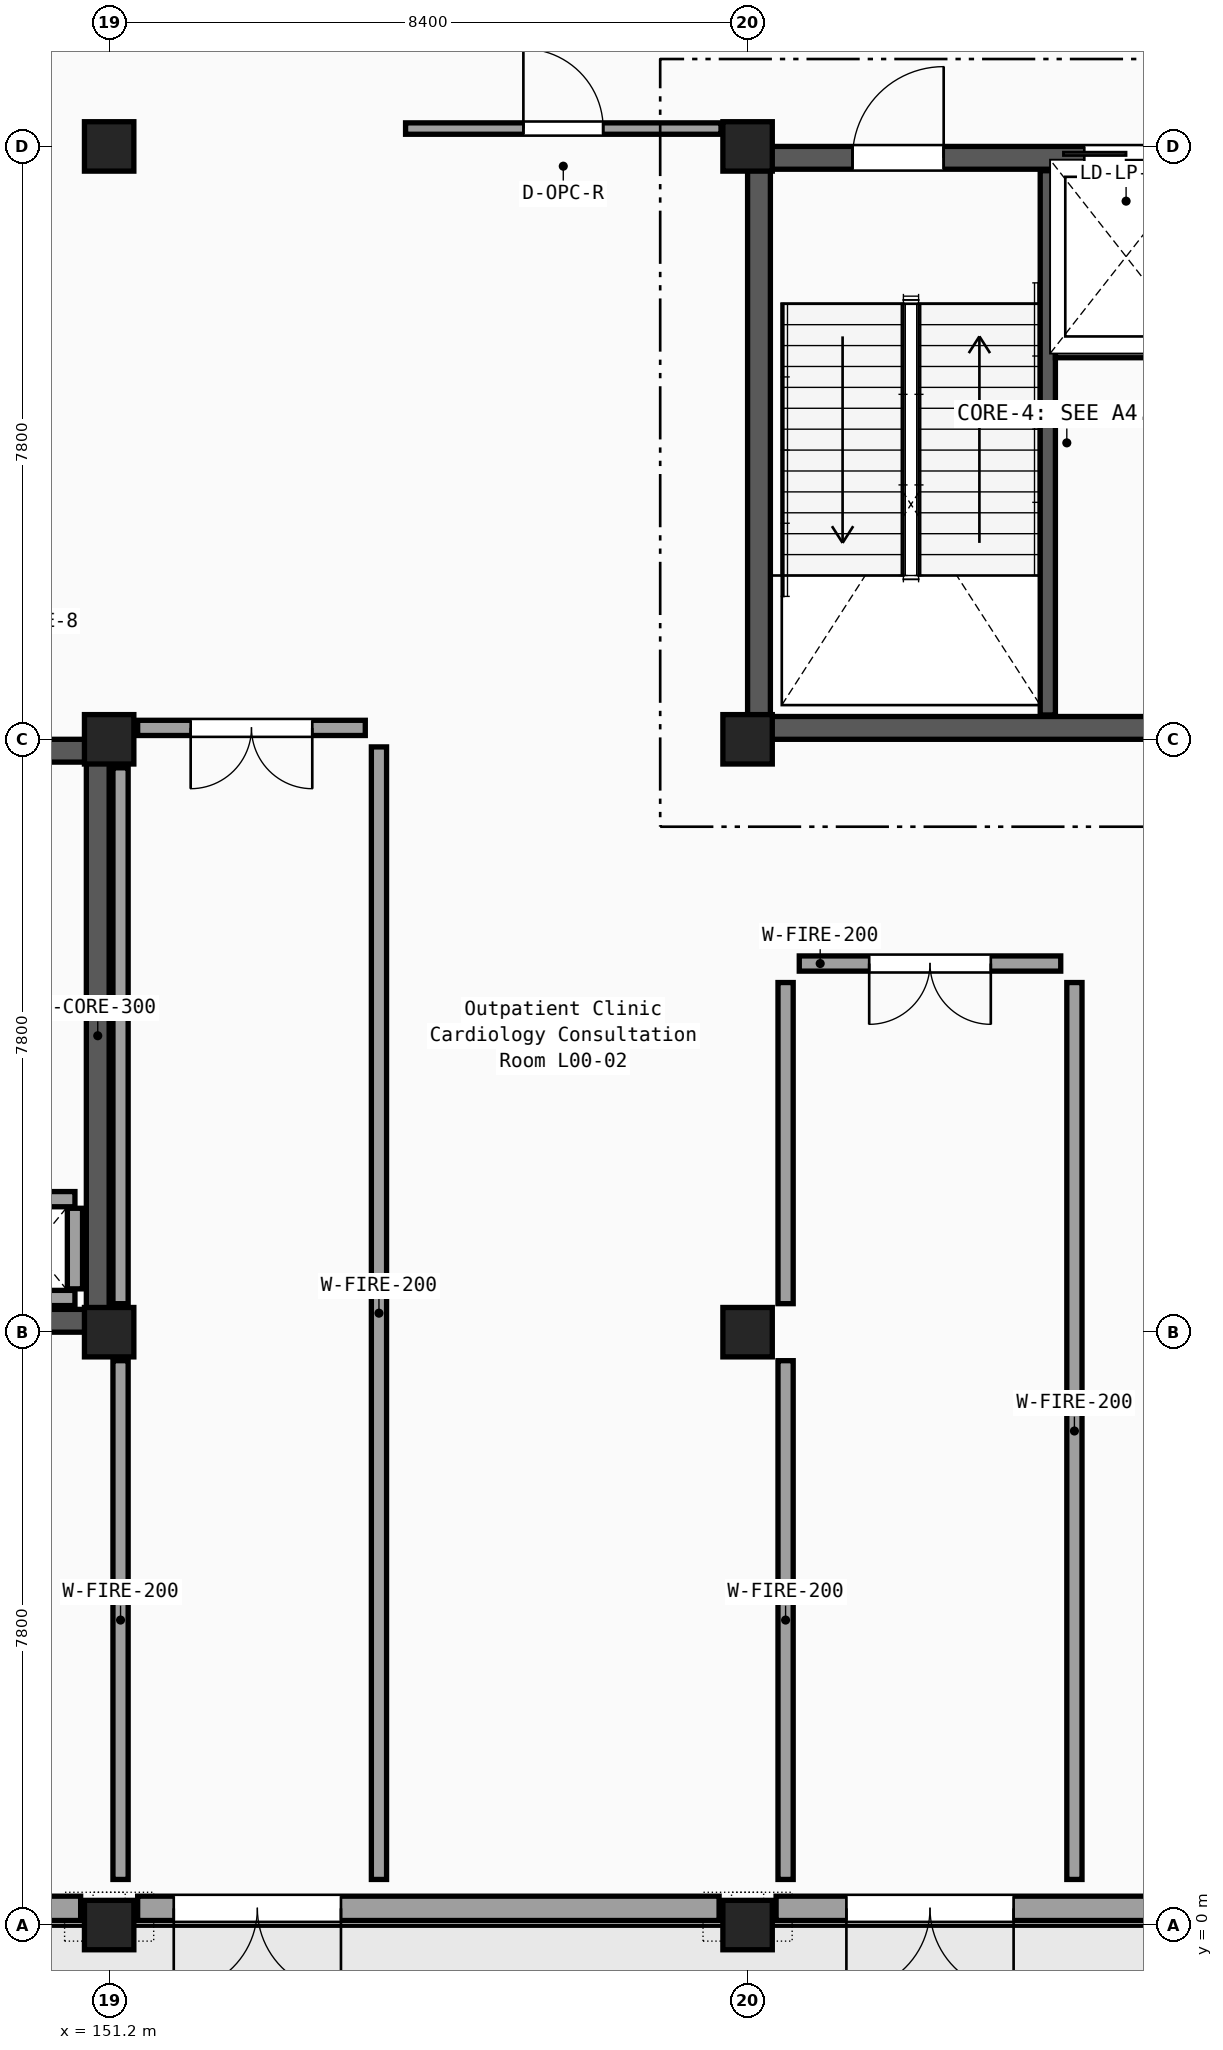
"""IFC4 building model, lengths in metres.
Left out: names, types, materials, properties, quantities, classifications, styles, units other than length and angle.
Written with IfcOpenShell. Run it as: python <this file> out.ifc"""

import sys

from ifc_helpers import new_model, si_unit, direction, frame, frame_2d, origin, origin_2d, place, context, subcontext, project, spatial, rectangle, extrude, element, fill, save


model = new_model("IFC4")
c1 = context("Model", 3, precision=1e-05, world=origin(), true_north=direction((0.0, 1.0)))
c2 = subcontext(c1, "Body", "Model", "MODEL_VIEW")
j1 = project(units=[si_unit("LENGTHUNIT", "METRE"), si_unit("PLANEANGLEUNIT", "RADIAN")], contexts=[c1])
p1 = place(None, origin())
s1 = spatial("IfcSite", under=j1, at=p1, CompositionType="ELEMENT")
p2 = place(p1, origin())
s2 = spatial("IfcBuilding", under=s1, at=p2, CompositionType="ELEMENT")
p3 = place(p2, origin())
s3 = spatial("IfcBuildingStorey", under=s2, at=p3, CompositionType="ELEMENT", Elevation=0.0)
for number, where, z_axis, x_axis in (
    (1, (151.2, 0.0, 0.0), (0.0, 0.0, 1.0), (1.0, 0.0, 0.0)),
    (2, (151.2, 7.8, 0.0), (0.0, 0.0, 1.0), (1.0, 0.0, 0.0)),
    (3, (151.2, 15.6, 0.0), (0.0, 0.0, 1.0), (1.0, 0.0, 0.0)),
    (4, (151.2, 23.4, 0.0), (0.0, 0.0, 1.0), (1.0, 0.0, 0.0)),
    (5, (159.6, 0.0, 0.0), (0.0, 0.0, 1.0), (1.0, 0.0, 0.0)),
    (6, (159.6, 7.8, 0.0), (0.0, 0.0, 1.0), (1.0, 0.0, 0.0)),
    (7, (159.6, 15.6, 0.0), (0.0, 0.0, 1.0), (1.0, 0.0, 0.0)),
    (8, (159.6, 23.4, 0.0), (0.0, 0.0, 1.0), (1.0, 0.0, 0.0)),
):
    element("IfcColumn", number, at=place(p3, frame(where, z_axis=z_axis, x_axis=x_axis)), inside=s3, PredefinedType="COLUMN", context=c2, shape_type="SweptSolid", body=[
        extrude(rectangle(XDim=0.65, YDim=0.65, at=origin_2d()), origin(), (0.0, 0.0, 1.0), 5.1),
    ])
p4 = place(p3, frame((143.175, 0.22, 0.0), z_axis=(0.0, 0.0, 1.0), x_axis=(1.0, 0.0, 0.0)))
e9 = element("IfcWall", 9, at=p4, inside=s3, PredefinedType="SOLIDWALL", context=c2, shape_type="SweptSolid", body=[
    extrude(rectangle(XDim=7.65, YDim=0.32, at=frame_2d((3.825, 0.0))), origin(), (0.0, 0.0, 1.0), 4.46),
])
p5 = place(p4, frame((2.725, 0.0, 0.0)))
e10 = element("IfcOpeningElement", 10, at=p5, cuts=e9, PredefinedType="OPENING", context=c2, shape_type="SweptSolid", body=[
    extrude(rectangle(XDim=2.2, YDim=2.3, at=frame_2d((1.1, 1.15))), frame((0.0, 0.17, 0.0), z_axis=(0.0, -1.0, 0.0), x_axis=(1.0, 0.0, 0.0)), (0.0, 0.0, 1.0), 0.34),
])
p6 = place(p3, frame((151.575, 0.22, 0.0), z_axis=(0.0, 0.0, 1.0), x_axis=(1.0, 0.0, 0.0)))
e11 = element("IfcWall", 11, at=p6, inside=s3, PredefinedType="SOLIDWALL", context=c2, shape_type="SweptSolid", body=[
    extrude(rectangle(XDim=7.65, YDim=0.32, at=frame_2d((3.825, 0.0))), origin(), (0.0, 0.0, 1.0), 4.46),
])
p7 = place(p6, frame((0.475, 0.0, 0.0)))
e12 = element("IfcOpeningElement", 12, at=p7, cuts=e11, PredefinedType="OPENING", context=c2, shape_type="SweptSolid", body=[
    extrude(rectangle(XDim=2.2, YDim=2.3, at=frame_2d((1.1, 1.15))), frame((0.0, 0.17, 0.0), z_axis=(0.0, -1.0, 0.0), x_axis=(1.0, 0.0, 0.0)), (0.0, 0.0, 1.0), 0.34),
])
p8 = place(p3, frame((159.975, 0.22, 0.0), z_axis=(0.0, 0.0, 1.0), x_axis=(1.0, 0.0, 0.0)))
e13 = element("IfcWall", 13, at=p8, inside=s3, PredefinedType="SOLIDWALL", context=c2, shape_type="SweptSolid", body=[
    extrude(rectangle(XDim=7.65, YDim=0.32, at=frame_2d((3.825, 0.0))), origin(), (0.0, 0.0, 1.0), 4.46),
])
p9 = place(p8, frame((0.925, 0.0, 0.0)))
e14 = element("IfcOpeningElement", 14, at=p9, cuts=e13, PredefinedType="OPENING", context=c2, shape_type="SweptSolid", body=[
    extrude(rectangle(XDim=2.2, YDim=2.3, at=frame_2d((1.1, 1.15))), frame((0.0, 0.17, 0.0), z_axis=(0.0, -1.0, 0.0), x_axis=(1.0, 0.0, 0.0)), (0.0, 0.0, 1.0), 0.34),
])
p10 = place(p3, frame((159.6, 15.75, 0.0), z_axis=(0.0, 0.0, 1.0), x_axis=(1.0, 0.0, 0.0)))
e15 = element("IfcWall", 15, at=p10, inside=s3, PredefinedType="SHEAR", context=c2, shape_type="SweptSolid", body=[
    extrude(rectangle(XDim=8.4, YDim=0.3, at=frame_2d((4.2, 0.0))), origin(), (0.0, 0.0, 1.0), 4.87),
])
p11 = place(p3, frame((159.6, 23.25, 0.0), z_axis=(0.0, 0.0, 1.0), x_axis=(1.0, 0.0, 0.0)))
e16 = element("IfcWall", 16, at=p11, inside=s3, PredefinedType="SHEAR", context=c2, shape_type="SweptSolid", body=[
    extrude(rectangle(XDim=8.4, YDim=0.3, at=frame_2d((4.2, 0.0))), origin(), (0.0, 0.0, 1.0), 4.87),
])
p12 = place(p11, frame((1.38, 0.0, 0.0)))
e17 = element("IfcOpeningElement", 17, at=p12, cuts=e16, PredefinedType="OPENING", context=c2, shape_type="SweptSolid", body=[
    extrude(rectangle(XDim=1.2, YDim=2.15, at=frame_2d((0.6, 1.075))), frame((0.0, 0.16, 0.0), z_axis=(0.0, -1.0, 0.0), x_axis=(1.0, 0.0, 0.0)), (0.0, 0.0, 1.0), 0.32),
])
p13 = place(p11, frame((4.43, 0.0, 0.0)))
e18 = element("IfcOpeningElement", 18, at=p13, cuts=e16, PredefinedType="OPENING", context=c2, shape_type="SweptSolid", body=[
    extrude(rectangle(XDim=1.1, YDim=2.15, at=frame_2d((0.55, 1.075))), frame((0.0, 0.16, 0.0), z_axis=(0.0, -1.0, 0.0), x_axis=(1.0, 0.0, 0.0)), (0.0, 0.0, 1.0), 0.32),
])
p14 = place(p11, frame((6.45, 0.0, 0.0)))
e19 = element("IfcOpeningElement", 19, at=p14, cuts=e16, PredefinedType="OPENING", context=c2, shape_type="SweptSolid", body=[
    extrude(rectangle(XDim=1.1, YDim=2.15, at=frame_2d((0.55, 1.075))), frame((0.0, 0.16, 0.0), z_axis=(0.0, -1.0, 0.0), x_axis=(1.0, 0.0, 0.0)), (0.0, 0.0, 1.0), 0.32),
])
p15 = place(p3, frame((159.75, 15.9, 0.0), z_axis=(0.0, 0.0, 1.0), x_axis=(0.0, 1.0, 0.0)))
e20 = element("IfcWall", 20, at=p15, inside=s3, PredefinedType="SHEAR", context=c2, shape_type="SweptSolid", body=[
    extrude(rectangle(XDim=7.2, YDim=0.3, at=frame_2d((3.6, 0.0))), origin(), (0.0, 0.0, 1.0), 4.87),
])
p16 = place(p3, frame((163.55, 15.92, 0.0), z_axis=(0.0, 0.0, 1.0), x_axis=(0.0, 1.0, 0.0)))
e21 = element("IfcWall", 21, at=p16, inside=s3, PredefinedType="SHEAR", context=c2, shape_type="SweptSolid", body=[
    extrude(rectangle(XDim=7.16, YDim=0.2, at=frame_2d((3.58, 0.0))), origin(), (0.0, 0.0, 1.0), 4.87),
])
p17 = place(p3, frame((163.65, 20.72, 0.0), z_axis=(0.0, 0.0, 1.0), x_axis=(1.0, 0.0, 0.0)))
e22 = element("IfcWall", 22, at=p17, inside=s3, PredefinedType="PARTITIONING", context=c2, shape_type="SweptSolid", body=[
    extrude(rectangle(XDim=1.86, YDim=0.2, at=frame_2d((0.93, 0.0))), origin(), (0.0, 0.0, 1.0), 4.35),
])
p18 = place(p3, frame((142.8, 7.95, 0.0), z_axis=(0.0, 0.0, 1.0), x_axis=(1.0, 0.0, 0.0)))
e23 = element("IfcWall", 23, at=p18, inside=s3, PredefinedType="SHEAR", context=c2, shape_type="SweptSolid", body=[
    extrude(rectangle(XDim=8.4, YDim=0.3, at=frame_2d((4.2, 0.0))), origin(), (0.0, 0.0, 1.0), 4.87),
])
p19 = place(p3, frame((142.8, 15.45, 0.0), z_axis=(0.0, 0.0, 1.0), x_axis=(1.0, 0.0, 0.0)))
e24 = element("IfcWall", 24, at=p19, inside=s3, PredefinedType="SHEAR", context=c2, shape_type="SweptSolid", body=[
    extrude(rectangle(XDim=8.4, YDim=0.3, at=frame_2d((4.2, 0.0))), origin(), (0.0, 0.0, 1.0), 4.87),
])
p20 = place(p19, frame((1.38, 0.0, 0.0)))
e25 = element("IfcOpeningElement", 25, at=p20, cuts=e24, PredefinedType="OPENING", context=c2, shape_type="SweptSolid", body=[
    extrude(rectangle(XDim=1.2, YDim=2.15, at=frame_2d((0.6, 1.075))), frame((0.0, 0.16, 0.0), z_axis=(0.0, -1.0, 0.0), x_axis=(1.0, 0.0, 0.0)), (0.0, 0.0, 1.0), 0.32),
])
p21 = place(p3, frame((151.05, 8.1, 0.0), z_axis=(0.0, 0.0, 1.0), x_axis=(0.0, 1.0, 0.0)))
e26 = element("IfcWall", 26, at=p21, inside=s3, PredefinedType="SHEAR", context=c2, shape_type="SweptSolid", body=[
    extrude(rectangle(XDim=7.2, YDim=0.3, at=frame_2d((3.6, 0.0))), origin(), (0.0, 0.0, 1.0), 4.87),
])
for number, where, z_axis, x_axis in (
    (27, (149.65, 8.25, 0.0), (0.0, 0.0, 1.0), (1.0, 0.0, 0.0)),
    (28, (149.65, 9.55, 0.0), (0.0, 0.0, 1.0), (1.0, 0.0, 0.0)),
):
    element("IfcWall", number, at=place(p3, frame(where, z_axis=z_axis, x_axis=x_axis)), inside=s3, PredefinedType="PARTITIONING", context=c2, shape_type="SweptSolid", body=[
        extrude(rectangle(XDim=1.1, YDim=0.2, at=frame_2d((0.55, 0.0))), origin(), (0.0, 0.0, 1.0), 4.25),
    ])
p22 = place(p3, frame((150.75, 8.37, 0.0), z_axis=(0.0, 0.0, 1.0), x_axis=(0.0, 1.0, 0.0)))
e29 = element("IfcWall", 29, at=p22, inside=s3, PredefinedType="PARTITIONING", context=c2, shape_type="SweptSolid", body=[
    extrude(rectangle(XDim=1.06, YDim=0.2, at=frame_2d((0.53, 0.0))), origin(), (0.0, 0.0, 1.0), 4.25),
])
p23 = place(p3, frame((160.1, 0.6, 0.0), z_axis=(0.0, 0.0, 1.0), x_axis=(0.0, 1.0, 0.0)))
e30 = element("IfcWall", 30, at=p23, inside=s3, PredefinedType="PARTITIONING", context=c2, shape_type="SweptSolid", body=[
    extrude(rectangle(XDim=6.825, YDim=0.2, at=frame_2d((3.413, 0.0))), origin(), (0.0, 0.0, 1.0), 4.82),
])
p24 = place(p3, frame((160.1, 8.175, 0.0), z_axis=(0.0, 0.0, 1.0), x_axis=(0.0, 1.0, 0.0)))
e31 = element("IfcWall", 31, at=p24, inside=s3, PredefinedType="PARTITIONING", context=c2, shape_type="SweptSolid", body=[
    extrude(rectangle(XDim=4.225, YDim=0.2, at=frame_2d((2.112, 0.0))), origin(), (0.0, 0.0, 1.0), 4.82),
])
p25 = place(p3, frame((163.9, 0.6, 0.0), z_axis=(0.0, 0.0, 1.0), x_axis=(0.0, 1.0, 0.0)))
e32 = element("IfcWall", 32, at=p25, inside=s3, PredefinedType="PARTITIONING", context=c2, shape_type="SweptSolid", body=[
    extrude(rectangle(XDim=11.8, YDim=0.2, at=frame_2d((5.9, 0.0))), origin(), (0.0, 0.0, 1.0), 4.35),
])
p26 = place(p3, frame((160.28, 12.65, 0.0), z_axis=(0.0, 0.0, 1.0), x_axis=(1.0, 0.0, 0.0)))
e33 = element("IfcWall", 33, at=p26, inside=s3, PredefinedType="PARTITIONING", context=c2, shape_type="SweptSolid", body=[
    extrude(rectangle(XDim=3.44, YDim=0.2, at=frame_2d((1.72, 0.0))), origin(), (0.0, 0.0, 1.0), 4.82),
])
p27 = place(p26, frame((0.92, 0.0, 0.0)))
e34 = element("IfcOpeningElement", 34, at=p27, cuts=e33, PredefinedType="OPENING", context=c2, shape_type="SweptSolid", body=[
    extrude(rectangle(XDim=1.6, YDim=2.2, at=frame_2d((0.8, 1.1))), frame((0.0, 0.11, 0.0), z_axis=(0.0, -1.0, 0.0), x_axis=(1.0, 0.0, 0.0)), (0.0, 0.0, 1.0), 0.22),
])
p28 = place(p3, frame((151.35, 0.6, 0.0), z_axis=(0.0, 0.0, 1.0), x_axis=(0.0, 1.0, 0.0)))
e35 = element("IfcWall", 35, at=p28, inside=s3, PredefinedType="PARTITIONING", context=c2, shape_type="SweptSolid", body=[
    extrude(rectangle(XDim=6.825, YDim=0.2, at=frame_2d((3.413, 0.0))), origin(), (0.0, 0.0, 1.0), 4.45),
])
p29 = place(p3, frame((151.35, 8.175, 0.0), z_axis=(0.0, 0.0, 1.0), x_axis=(0.0, 1.0, 0.0)))
e36 = element("IfcWall", 36, at=p29, inside=s3, PredefinedType="PARTITIONING", context=c2, shape_type="SweptSolid", body=[
    extrude(rectangle(XDim=7.05, YDim=0.2, at=frame_2d((3.525, 0.0))), origin(), (0.0, 0.0, 1.0), 4.45),
])
p30 = place(p3, frame((154.75, 0.6, 0.0), z_axis=(0.0, 0.0, 1.0), x_axis=(0.0, 1.0, 0.0)))
e37 = element("IfcWall", 37, at=p30, inside=s3, PredefinedType="PARTITIONING", context=c2, shape_type="SweptSolid", body=[
    extrude(rectangle(XDim=14.9, YDim=0.2, at=frame_2d((7.45, 0.0))), origin(), (0.0, 0.0, 1.0), 4.35),
])
p31 = place(p3, frame((151.575, 15.75, 0.0), z_axis=(0.0, 0.0, 1.0), x_axis=(1.0, 0.0, 0.0)))
e38 = element("IfcWall", 38, at=p31, inside=s3, PredefinedType="PARTITIONING", context=c2, shape_type="SweptSolid", body=[
    extrude(rectangle(XDim=2.995, YDim=0.2, at=frame_2d((1.498, 0.0))), origin(), (0.0, 0.0, 1.0), 4.35),
])
p32 = place(p31, frame((0.698, 0.0, 0.0)))
e39 = element("IfcOpeningElement", 39, at=p32, cuts=e38, PredefinedType="OPENING", context=c2, shape_type="SweptSolid", body=[
    extrude(rectangle(XDim=1.6, YDim=2.2, at=frame_2d((0.8, 1.1))), frame((0.0, 0.11, 0.0), z_axis=(0.0, -1.0, 0.0), x_axis=(1.0, 0.0, 0.0)), (0.0, 0.0, 1.0), 0.22),
])
p33 = place(p3, frame((155.1, 23.635, 0.0), z_axis=(0.0, 0.0, 1.0), x_axis=(1.0, 0.0, 0.0)))
e40 = element("IfcWall", 40, at=p33, inside=s3, PredefinedType="PARTITIONING", context=c2, shape_type="SweptSolid", body=[
    extrude(rectangle(XDim=4.15, YDim=0.15, at=frame_2d((2.075, 0.0))), origin(), (0.0, 0.0, 1.0), 4.35),
])
p34 = place(p33, frame((1.55, 0.0, 0.0)))
e41 = element("IfcOpeningElement", 41, at=p34, cuts=e40, PredefinedType="OPENING", context=c2, shape_type="SweptSolid", body=[
    extrude(rectangle(XDim=1.05, YDim=2.15, at=frame_2d((0.525, 1.075))), frame((0.0, 0.085, 0.0), z_axis=(0.0, -1.0, 0.0), x_axis=(1.0, 0.0, 0.0)), (0.0, 0.0, 1.0), 0.17),
])
p35 = place(p7, frame((2.2, 0.0, 0.0), z_axis=(0.0, 0.0, 1.0), x_axis=(-1.0, 0.0, 0.0)))
e42 = element("IfcDoor", 42, at=p35, inside=s3, OperationType="DOUBLE_DOOR_SINGLE_SWING", PredefinedType="DOOR", context=c2, shape_type="SweptSolid", body=[
    extrude(rectangle(XDim=2.2, YDim=2.3, at=frame_2d((1.1, 1.15))), frame((0.0, 0.025, 0.0), z_axis=(0.0, -1.0, 0.0), x_axis=(1.0, 0.0, 0.0)), (0.0, 0.0, 1.0), 0.05),
])
fill(e12, e42)
p36 = place(p9, frame((2.2, 0.0, 0.0), z_axis=(0.0, 0.0, 1.0), x_axis=(-1.0, 0.0, 0.0)))
e43 = element("IfcDoor", 43, at=p36, inside=s3, OperationType="DOUBLE_DOOR_SINGLE_SWING", PredefinedType="DOOR", context=c2, shape_type="SweptSolid", body=[
    extrude(rectangle(XDim=2.2, YDim=2.3, at=frame_2d((1.1, 1.15))), frame((0.0, 0.025, 0.0), z_axis=(0.0, -1.0, 0.0), x_axis=(1.0, 0.0, 0.0)), (0.0, 0.0, 1.0), 0.05),
])
fill(e14, e43)
p37 = place(p12, origin())
e44 = element("IfcDoor", 44, at=p37, inside=s3, OperationType="SINGLE_SWING_RIGHT", PredefinedType="DOOR", context=c2, shape_type="SweptSolid", body=[
    extrude(rectangle(XDim=1.2, YDim=2.15, at=frame_2d((0.6, 1.075))), frame((0.0, 0.025, 0.0), z_axis=(0.0, -1.0, 0.0), x_axis=(1.0, 0.0, 0.0)), (0.0, 0.0, 1.0), 0.05),
])
fill(e17, e44)
p38 = place(p13, origin())
e45 = element("IfcDoor", 45, at=p38, inside=s3, OperationType="DOUBLE_DOOR_SLIDING", PredefinedType="DOOR", context=c2, shape_type="SweptSolid", body=[
    extrude(rectangle(XDim=1.1, YDim=2.15, at=frame_2d((0.55, 1.075))), frame((0.0, 0.025, 0.0), z_axis=(0.0, -1.0, 0.0), x_axis=(1.0, 0.0, 0.0)), (0.0, 0.0, 1.0), 0.05),
])
fill(e18, e45)
p39 = place(p27, frame((1.6, 0.0, 0.0), z_axis=(0.0, 0.0, 1.0), x_axis=(-1.0, 0.0, 0.0)))
e46 = element("IfcDoor", 46, at=p39, inside=s3, OperationType="DOUBLE_DOOR_SINGLE_SWING", PredefinedType="DOOR", context=c2, shape_type="SweptSolid", body=[
    extrude(rectangle(XDim=1.6, YDim=2.2, at=frame_2d((0.8, 1.1))), frame((0.0, 0.025, 0.0), z_axis=(0.0, -1.0, 0.0), x_axis=(1.0, 0.0, 0.0)), (0.0, 0.0, 1.0), 0.05),
])
fill(e34, e46)
p40 = place(p32, frame((1.6, 0.0, 0.0), z_axis=(0.0, 0.0, 1.0), x_axis=(-1.0, 0.0, 0.0)))
e47 = element("IfcDoor", 47, at=p40, inside=s3, OperationType="DOUBLE_DOOR_SINGLE_SWING", PredefinedType="DOOR", context=c2, shape_type="SweptSolid", body=[
    extrude(rectangle(XDim=1.6, YDim=2.2, at=frame_2d((0.8, 1.1))), frame((0.0, 0.025, 0.0), z_axis=(0.0, -1.0, 0.0), x_axis=(1.0, 0.0, 0.0)), (0.0, 0.0, 1.0), 0.05),
])
fill(e39, e47)
p41 = place(p34, origin())
e48 = element("IfcDoor", 48, at=p41, inside=s3, OperationType="SINGLE_SWING_LEFT", PredefinedType="DOOR", context=c2, shape_type="SweptSolid", body=[
    extrude(rectangle(XDim=1.05, YDim=2.15, at=frame_2d((0.525, 1.075))), frame((0.0, 0.025, 0.0), z_axis=(0.0, -1.0, 0.0), x_axis=(1.0, 0.0, 0.0)), (0.0, 0.0, 1.0), 0.05),
])
fill(e41, e48)
save(model, sys.argv[1])
